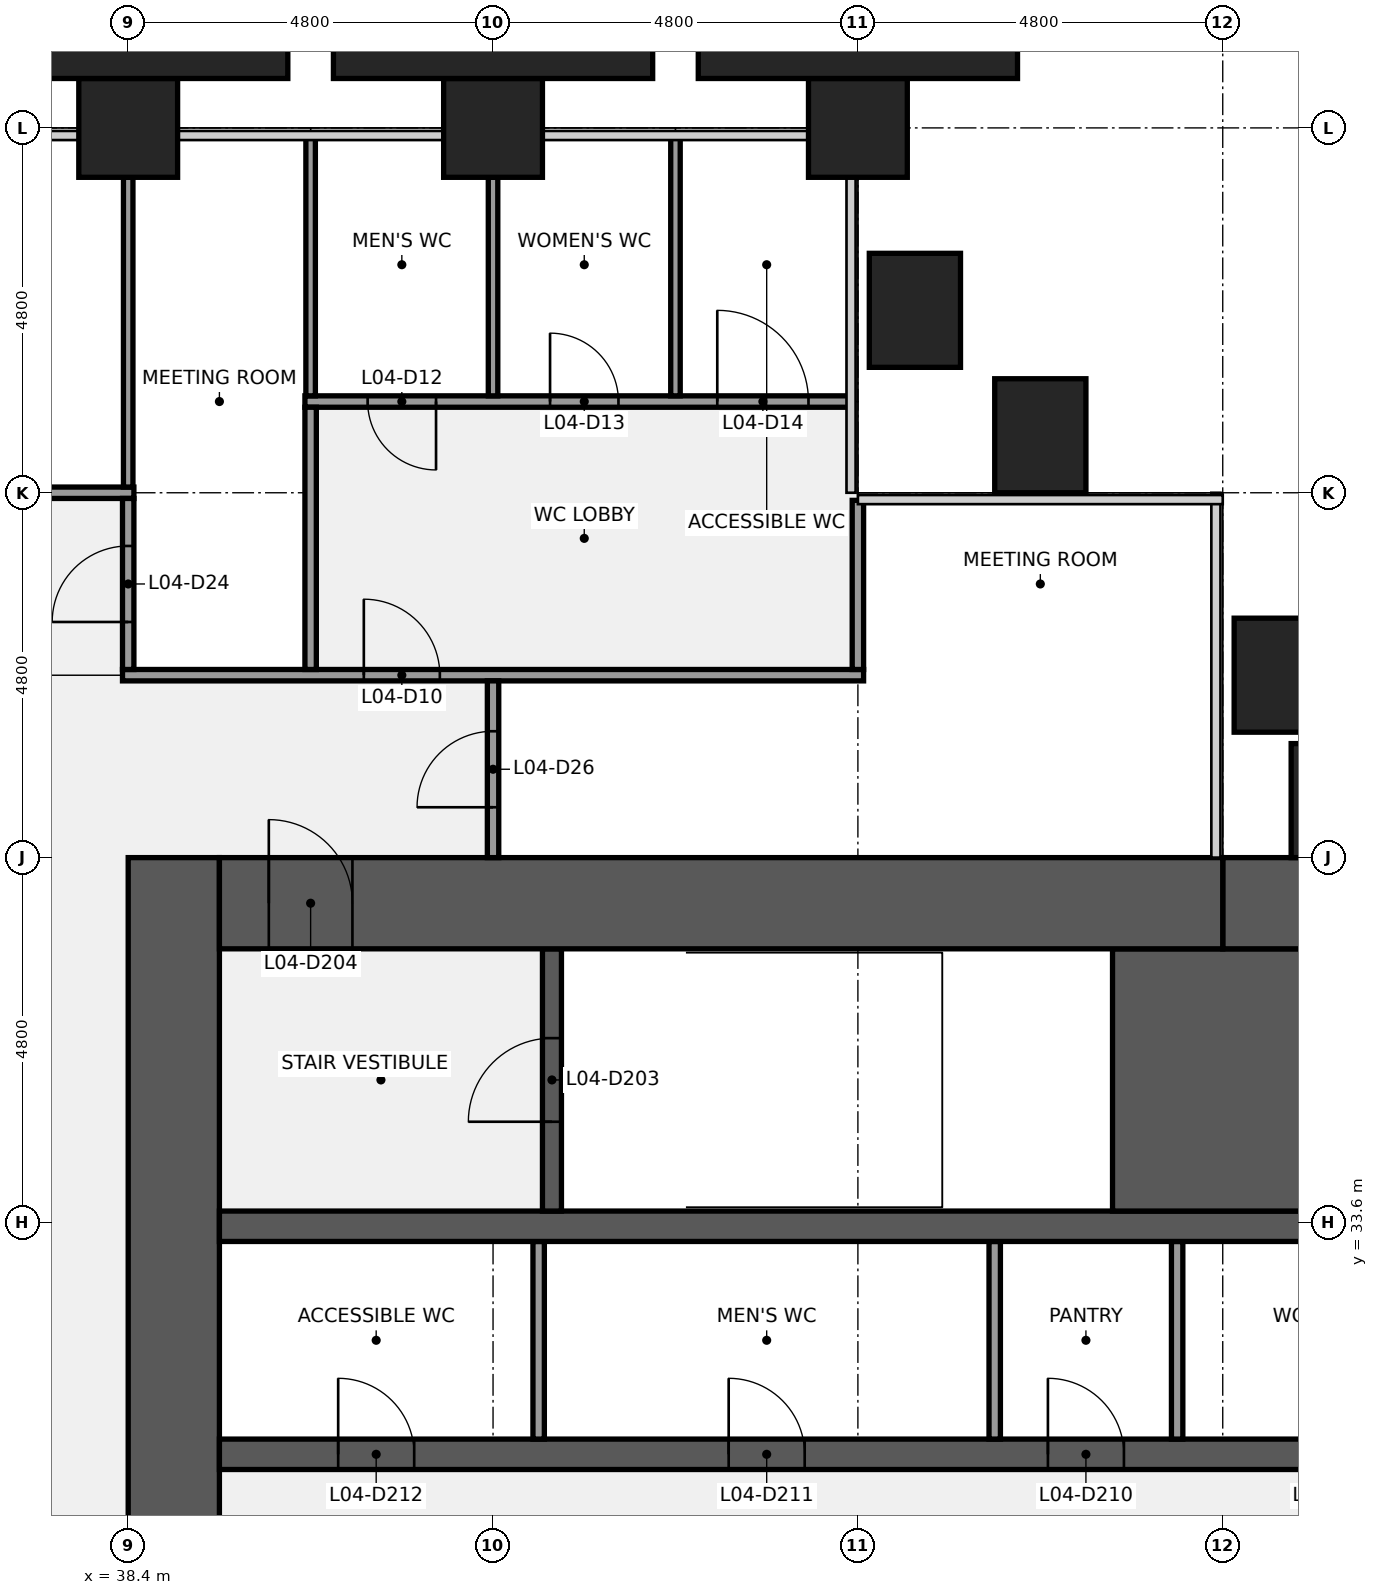
"""IFC4 building model, lengths in metres.
Left out: names, types, materials, properties, quantities, classifications, styles, units other than length and angle.
Written with IfcOpenShell. Run it as: python <this file> out.ifc"""

import sys

from ifc_helpers import new_model, si_unit, direction, frame, frame_2d, origin, origin_2d, place, context, subcontext, project, spatial, rectangle, extrude, element, fill, save


model = new_model("IFC4")
c1 = context("Model", 3, precision=1e-05, world=origin(), true_north=direction((0.0, 1.0)))
c2 = subcontext(c1, "Body", "Model", "MODEL_VIEW")
j1 = project(units=[si_unit("LENGTHUNIT", "METRE"), si_unit("PLANEANGLEUNIT", "RADIAN")], contexts=[c1])
p1 = place(None, origin())
s1 = spatial("IfcSite", under=j1, at=p1, CompositionType="ELEMENT")
p2 = place(p1, origin())
s2 = spatial("IfcBuilding", under=s1, at=p2, CompositionType="ELEMENT")
p3 = place(p2, frame((0.0, 0.0, 25.8)))
s3 = spatial("IfcBuildingStorey", under=s2, at=p3, CompositionType="ELEMENT", Elevation=25.8)
for number, where, z_axis, x_axis in (
    (1, (38.4, 48.0, 0.0), (0.0, 0.0, 1.0), (1.0, 0.0, 0.0)),
    (2, (43.2, 48.0, 0.0), (0.0, 0.0, 1.0), (1.0, 0.0, 0.0)),
    (3, (48.0, 48.0, 0.0), (0.0, 0.0, 1.0), (1.0, 0.0, 0.0)),
):
    element("IfcColumn", number, at=place(p3, frame(where, z_axis=z_axis, x_axis=x_axis)), inside=s3, PredefinedType="COLUMN", context=c2, shape_type="SweptSolid", body=[
        extrude(rectangle(XDim=1.3, YDim=1.3, at=origin_2d()), origin(), (0.0, 0.0, 1.0), 4.4),
    ])
p4 = place(p3, frame((39.0, 9.6, 0.0), z_axis=(0.0, 0.0, 1.0), x_axis=(0.0, 1.0, 0.0)))
e4 = element("IfcWall", 4, at=p4, inside=s3, PredefinedType="SHEAR", context=c2, shape_type="SweptSolid", body=[
    extrude(rectangle(XDim=28.8, YDim=1.2, at=frame_2d((14.4, 0.0))), origin(), (0.0, 0.0, 1.0), 4.24),
])
p5 = place(p4, frame((8.7, 0.0, 0.0)))
e5 = element("IfcOpeningElement", 5, at=p5, cuts=e4, PredefinedType="OPENING", context=c2, shape_type="SweptSolid", body=[
    extrude(rectangle(XDim=1.8, YDim=2.1, at=frame_2d((0.9, 1.05))), frame((0.0, 0.61, 0.0), z_axis=(0.0, -1.0, 0.0), x_axis=(1.0, 0.0, 0.0)), (0.0, 0.0, 1.0), 1.22),
])
p6 = place(p4, frame((18.3, 0.0, 0.0)))
e6 = element("IfcOpeningElement", 6, at=p6, cuts=e4, PredefinedType="OPENING", context=c2, shape_type="SweptSolid", body=[
    extrude(rectangle(XDim=1.8, YDim=2.1, at=frame_2d((0.9, 1.05))), frame((0.0, 0.61, 0.0), z_axis=(0.0, -1.0, 0.0), x_axis=(1.0, 0.0, 0.0)), (0.0, 0.0, 1.0), 1.22),
])
p7 = place(p3, frame((39.6, 30.55, 0.0), z_axis=(0.0, 0.0, 1.0), x_axis=(1.0, 0.0, 0.0)))
e7 = element("IfcWall", 7, at=p7, inside=s3, PredefinedType="SHEAR", context=c2, shape_type="SweptSolid", body=[
    extrude(rectangle(XDim=16.8, YDim=0.4, at=frame_2d((8.4, 0.0))), origin(), (0.0, 0.0, 1.0), 4.24),
])
p8 = place(p7, frame((14.238, 0.0, 0.0)))
e8 = element("IfcOpeningElement", 8, at=p8, cuts=e7, PredefinedType="OPENING", context=c2, shape_type="SweptSolid", body=[
    extrude(rectangle(XDim=1.0, YDim=2.1, at=frame_2d((0.5, 1.05))), frame((0.0, 0.21, 0.0), z_axis=(0.0, -1.0, 0.0), x_axis=(1.0, 0.0, 0.0)), (0.0, 0.0, 1.0), 0.42),
])
p9 = place(p7, frame((10.9, 0.0, 0.0)))
e9 = element("IfcOpeningElement", 9, at=p9, cuts=e7, PredefinedType="OPENING", context=c2, shape_type="SweptSolid", body=[
    extrude(rectangle(XDim=1.0, YDim=2.1, at=frame_2d((0.5, 1.05))), frame((0.0, 0.21, 0.0), z_axis=(0.0, -1.0, 0.0), x_axis=(1.0, 0.0, 0.0)), (0.0, 0.0, 1.0), 0.42),
])
p10 = place(p7, frame((6.7, 0.0, 0.0)))
e10 = element("IfcOpeningElement", 10, at=p10, cuts=e7, PredefinedType="OPENING", context=c2, shape_type="SweptSolid", body=[
    extrude(rectangle(XDim=1.0, YDim=2.1, at=frame_2d((0.5, 1.05))), frame((0.0, 0.21, 0.0), z_axis=(0.0, -1.0, 0.0), x_axis=(1.0, 0.0, 0.0)), (0.0, 0.0, 1.0), 0.42),
])
p11 = place(p7, frame((1.562, 0.0, 0.0)))
e11 = element("IfcOpeningElement", 11, at=p11, cuts=e7, PredefinedType="OPENING", context=c2, shape_type="SweptSolid", body=[
    extrude(rectangle(XDim=1.0, YDim=2.1, at=frame_2d((0.5, 1.05))), frame((0.0, 0.21, 0.0), z_axis=(0.0, -1.0, 0.0), x_axis=(1.0, 0.0, 0.0)), (0.0, 0.0, 1.0), 0.42),
])
for number, where, z_axis, x_axis in (
    (12, (52.2, 30.75, 0.0), (0.0, 0.0, 1.0), (0.0, 1.0, 0.0)),
    (13, (49.8, 30.75, 0.0), (0.0, 0.0, 1.0), (0.0, 1.0, 0.0)),
    (14, (43.8, 30.75, 0.0), (0.0, 0.0, 1.0), (0.0, 1.0, 0.0)),
):
    element("IfcWall", number, at=place(p3, frame(where, z_axis=z_axis, x_axis=x_axis)), inside=s3, PredefinedType="PARTITIONING", context=c2, shape_type="SweptSolid", body=[
        extrude(rectangle(XDim=2.6, YDim=0.15, at=frame_2d((1.3, 0.0))), origin(), (0.0, 0.0, 1.0), 4.24),
    ])
p12 = place(p3, frame((39.6, 33.55, 0.0), z_axis=(0.0, 0.0, 1.0), x_axis=(1.0, 0.0, 0.0)))
e15 = element("IfcWall", 15, at=p12, inside=s3, PredefinedType="SHEAR", context=c2, shape_type="SweptSolid", body=[
    extrude(rectangle(XDim=16.8, YDim=0.4, at=frame_2d((8.4, 0.0))), origin(), (0.0, 0.0, 1.0), 4.24),
])
p13 = place(p3, frame((51.35, 35.475, 0.0), z_axis=(0.0, 0.0, 1.0), x_axis=(1.0, 0.0, 0.0)))
e16 = element("IfcWall", 16, at=p13, inside=s3, PredefinedType="SHEAR", context=c2, shape_type="SweptSolid", body=[
    extrude(rectangle(XDim=5.05, YDim=3.45, at=frame_2d((2.525, 0.0))), origin(), (0.0, 0.0, 1.0), 4.24),
])
p14 = place(p3, frame((43.975, 33.75, 0.0), z_axis=(0.0, 0.0, 1.0), x_axis=(0.0, 1.0, 0.0)))
e17 = element("IfcWall", 17, at=p14, inside=s3, PredefinedType="SHEAR", context=c2, shape_type="SweptSolid", body=[
    extrude(rectangle(XDim=3.45, YDim=0.25, at=frame_2d((1.725, 0.0))), origin(), (0.0, 0.0, 1.0), 4.24),
])
p15 = place(p14, frame((1.175, 0.0, 0.0)))
e18 = element("IfcOpeningElement", 18, at=p15, cuts=e17, PredefinedType="OPENING", context=c2, shape_type="SweptSolid", body=[
    extrude(rectangle(XDim=1.1, YDim=2.1, at=frame_2d((0.55, 1.05))), frame((0.0, 0.135, 0.0), z_axis=(0.0, -1.0, 0.0), x_axis=(1.0, 0.0, 0.0)), (0.0, 0.0, 1.0), 0.27),
])
p16 = place(p3, frame((52.8, 37.8, 0.0), z_axis=(0.0, 0.0, 1.0), x_axis=(1.0, 0.0, 0.0)))
e19 = element("IfcWall", 19, at=p16, inside=s3, PredefinedType="SHEAR", context=c2, shape_type="SweptSolid", body=[
    extrude(rectangle(XDim=3.6, YDim=1.2, at=frame_2d((1.8, 0.0))), origin(), (0.0, 0.0, 1.0), 4.24),
])
p17 = place(p3, frame((39.6, 37.8, 0.0), z_axis=(0.0, 0.0, 1.0), x_axis=(1.0, 0.0, 0.0)))
e20 = element("IfcWall", 20, at=p17, inside=s3, PredefinedType="SHEAR", context=c2, shape_type="SweptSolid", body=[
    extrude(rectangle(XDim=13.2, YDim=1.2, at=frame_2d((6.6, 0.0))), origin(), (0.0, 0.0, 1.0), 4.24),
])
p18 = place(p17, frame((0.65, 0.0, 0.0)))
e21 = element("IfcOpeningElement", 21, at=p18, cuts=e20, PredefinedType="OPENING", context=c2, shape_type="SweptSolid", body=[
    extrude(rectangle(XDim=1.1, YDim=2.1, at=frame_2d((0.55, 1.05))), frame((0.0, 0.61, 0.0), z_axis=(0.0, -1.0, 0.0), x_axis=(1.0, 0.0, 0.0)), (0.0, 0.0, 1.0), 1.22),
])
p19 = place(p3, frame((38.325, 40.8, 0.0), z_axis=(0.0, 0.0, 1.0), x_axis=(1.0, 0.0, 0.0)))
e22 = element("IfcWall", 22, at=p19, inside=s3, PredefinedType="PARTITIONING", context=c2, shape_type="SweptSolid", body=[
    extrude(rectangle(XDim=9.75, YDim=0.15, at=frame_2d((4.875, 0.0))), origin(), (0.0, 0.0, 1.0), 3.27),
])
p20 = place(p19, frame((3.175, 0.0, 0.0)))
e23 = element("IfcOpeningElement", 23, at=p20, cuts=e22, PredefinedType="OPENING", context=c2, shape_type="SweptSolid", body=[
    extrude(rectangle(XDim=1.0, YDim=2.1, at=frame_2d((0.5, 1.05))), frame((0.0, 0.085, 0.0), z_axis=(0.0, -1.0, 0.0), x_axis=(1.0, 0.0, 0.0)), (0.0, 0.0, 1.0), 0.17),
])
p21 = place(p3, frame((19.125, 43.2, 0.0), z_axis=(0.0, 0.0, 1.0), x_axis=(1.0, 0.0, 0.0)))
e24 = element("IfcWall", 24, at=p21, inside=s3, PredefinedType="PARTITIONING", context=c2, shape_type="SweptSolid", body=[
    extrude(rectangle(XDim=19.35, YDim=0.15, at=frame_2d((9.675, 0.0))), origin(), (0.0, 0.0, 1.0), 3.27),
])
p22 = place(p21, frame((9.175, 0.0, 0.0)))
e25 = element("IfcOpeningElement", 25, at=p22, cuts=e24, PredefinedType="OPENING", context=c2, shape_type="SweptSolid", body=[
    extrude(rectangle(XDim=1.0, YDim=2.1, at=frame_2d((0.5, 1.05))), frame((0.0, 0.085, 0.0), z_axis=(0.0, -1.0, 0.0), x_axis=(1.0, 0.0, 0.0)), (0.0, 0.0, 1.0), 0.17),
])
p23 = place(p3, frame((40.725, 44.4, 0.0), z_axis=(0.0, 0.0, 1.0), x_axis=(1.0, 0.0, 0.0)))
e26 = element("IfcWall", 26, at=p23, inside=s3, PredefinedType="PARTITIONING", context=c2, shape_type="SweptSolid", body=[
    extrude(rectangle(XDim=7.175, YDim=0.15, at=frame_2d((3.587, 0.0))), origin(), (0.0, 0.0, 1.0), 3.27),
])
p24 = place(p23, frame((0.825, 0.0, 0.0)))
e27 = element("IfcOpeningElement", 27, at=p24, cuts=e26, PredefinedType="OPENING", context=c2, shape_type="SweptSolid", body=[
    extrude(rectangle(XDim=0.9, YDim=2.1, at=frame_2d((0.45, 1.05))), frame((0.0, 0.085, 0.0), z_axis=(0.0, -1.0, 0.0), x_axis=(1.0, 0.0, 0.0)), (0.0, 0.0, 1.0), 0.17),
])
p25 = place(p23, frame((3.225, 0.0, 0.0)))
e28 = element("IfcOpeningElement", 28, at=p25, cuts=e26, PredefinedType="OPENING", context=c2, shape_type="SweptSolid", body=[
    extrude(rectangle(XDim=0.9, YDim=2.1, at=frame_2d((0.45, 1.05))), frame((0.0, 0.085, 0.0), z_axis=(0.0, -1.0, 0.0), x_axis=(1.0, 0.0, 0.0)), (0.0, 0.0, 1.0), 0.17),
])
p26 = place(p23, frame((5.425, 0.0, 0.0)))
e29 = element("IfcOpeningElement", 29, at=p26, cuts=e26, PredefinedType="OPENING", context=c2, shape_type="SweptSolid", body=[
    extrude(rectangle(XDim=1.2, YDim=2.1, at=frame_2d((0.6, 1.05))), frame((0.0, 0.085, 0.0), z_axis=(0.0, -1.0, 0.0), x_axis=(1.0, 0.0, 0.0)), (0.0, 0.0, 1.0), 0.17),
])
p27 = place(p3, frame((38.4, 43.275, 0.0), z_axis=(0.0, 0.0, 1.0), x_axis=(0.0, 1.0, 0.0)))
e30 = element("IfcWall", 30, at=p27, inside=s3, PredefinedType="PARTITIONING", context=c2, shape_type="SweptSolid", body=[
    extrude(rectangle(XDim=4.075, YDim=0.125, at=frame_2d((2.038, 0.0))), origin(), (0.0, 0.0, 1.0), 3.27),
])
p28 = place(p3, frame((38.4, 40.875, 0.0), z_axis=(0.0, 0.0, 1.0), x_axis=(0.0, 1.0, 0.0)))
e31 = element("IfcWall", 31, at=p28, inside=s3, PredefinedType="PARTITIONING", context=c2, shape_type="SweptSolid", body=[
    extrude(rectangle(XDim=2.25, YDim=0.15, at=frame_2d((1.125, 0.0))), origin(), (0.0, 0.0, 1.0), 3.27),
])
p29 = place(p28, frame((0.625, 0.0, 0.0)))
e32 = element("IfcOpeningElement", 32, at=p29, cuts=e31, PredefinedType="OPENING", context=c2, shape_type="SweptSolid", body=[
    extrude(rectangle(XDim=1.0, YDim=2.1, at=frame_2d((0.5, 1.05))), frame((0.0, 0.085, 0.0), z_axis=(0.0, -1.0, 0.0), x_axis=(1.0, 0.0, 0.0)), (0.0, 0.0, 1.0), 0.17),
])
p30 = place(p3, frame((40.8, 44.475, 0.0), z_axis=(0.0, 0.0, 1.0), x_axis=(0.0, 1.0, 0.0)))
e33 = element("IfcWall", 33, at=p30, inside=s3, PredefinedType="PARTITIONING", context=c2, shape_type="SweptSolid", body=[
    extrude(rectangle(XDim=3.425, YDim=0.125, at=frame_2d((1.712, 0.0))), origin(), (0.0, 0.0, 1.0), 3.27),
])
p31 = place(p3, frame((40.8, 40.875, 0.0), z_axis=(0.0, 0.0, 1.0), x_axis=(0.0, 1.0, 0.0)))
e34 = element("IfcWall", 34, at=p31, inside=s3, PredefinedType="PARTITIONING", context=c2, shape_type="SweptSolid", body=[
    extrude(rectangle(XDim=3.45, YDim=0.15, at=frame_2d((1.725, 0.0))), origin(), (0.0, 0.0, 1.0), 3.27),
])
p32 = place(p3, frame((43.2, 44.475, 0.0), z_axis=(0.0, 0.0, 1.0), x_axis=(0.0, 1.0, 0.0)))
e35 = element("IfcWall", 35, at=p32, inside=s3, PredefinedType="PARTITIONING", context=c2, shape_type="SweptSolid", body=[
    extrude(rectangle(XDim=2.875, YDim=0.125, at=frame_2d((1.438, 0.0))), origin(), (0.0, 0.0, 1.0), 3.27),
])
p33 = place(p3, frame((43.2, 38.4, 0.0), z_axis=(0.0, 0.0, 1.0), x_axis=(0.0, 1.0, 0.0)))
e36 = element("IfcWall", 36, at=p33, inside=s3, PredefinedType="PARTITIONING", context=c2, shape_type="SweptSolid", body=[
    extrude(rectangle(XDim=2.325, YDim=0.15, at=frame_2d((1.163, 0.0))), origin(), (0.0, 0.0, 1.0), 3.27),
])
p34 = place(p33, frame((0.663, 0.0, 0.0)))
e37 = element("IfcOpeningElement", 37, at=p34, cuts=e36, PredefinedType="OPENING", context=c2, shape_type="SweptSolid", body=[
    extrude(rectangle(XDim=1.0, YDim=2.1, at=frame_2d((0.5, 1.05))), frame((0.0, 0.085, 0.0), z_axis=(0.0, -1.0, 0.0), x_axis=(1.0, 0.0, 0.0)), (0.0, 0.0, 1.0), 0.17),
])
p35 = place(p3, frame((45.6, 44.475, 0.0), z_axis=(0.0, 0.0, 1.0), x_axis=(0.0, 1.0, 0.0)))
e38 = element("IfcWall", 38, at=p35, inside=s3, PredefinedType="PARTITIONING", context=c2, shape_type="SweptSolid", body=[
    extrude(rectangle(XDim=3.425, YDim=0.125, at=frame_2d((1.712, 0.0))), origin(), (0.0, 0.0, 1.0), 3.27),
])
p36 = place(p3, frame((48.0, 40.875, 0.0), z_axis=(0.0, 0.0, 1.0), x_axis=(0.0, 1.0, 0.0)))
e39 = element("IfcWall", 39, at=p36, inside=s3, PredefinedType="PARTITIONING", context=c2, shape_type="SweptSolid", body=[
    extrude(rectangle(XDim=2.225, YDim=0.15, at=frame_2d((1.113, 0.0))), origin(), (0.0, 0.0, 1.0), 3.27),
])
for number, where, z_axis, x_axis in (
    (40, (53.55, 40.8, 0.0), (0.0, 0.0, 1.0), (0.0, 1.0, 0.0)),
    (41, (50.4, 43.95, 0.0), (0.0, 0.0, 1.0), (1.0, 0.0, 0.0)),
    (42, (48.75, 45.6, 0.0), (0.0, 0.0, 1.0), (0.0, 1.0, 0.0)),
):
    element("IfcColumn", number, at=place(p3, frame(where, z_axis=z_axis, x_axis=x_axis)), inside=s3, PredefinedType="PILASTER", context=c2, shape_type="SweptSolid", body=[
        extrude(rectangle(XDim=1.2, YDim=1.5, at=origin_2d()), origin(), (0.0, 0.0, 1.0), 4.4),
    ])
p37 = place(p3, frame((55.2, 39.15, 0.0), z_axis=(0.0, 0.0, 1.0), x_axis=(1.0, 0.0, 0.0)))
e43 = element("IfcColumn", 43, at=p37, inside=s3, PredefinedType="PILASTER", context=c2, shape_type="SweptSolid", body=[
    extrude(rectangle(XDim=3.0, YDim=1.5, at=origin_2d()), origin(), (0.0, 0.0, 1.0), 4.4),
])
for number, where, z_axis, x_axis in (
    (44, (38.4, 49.075, 0.0), (0.0, 0.0, 1.0), (1.0, 0.0, 0.0)),
    (45, (43.2, 49.075, 0.0), (0.0, 0.0, 1.0), (1.0, 0.0, 0.0)),
    (46, (48.0, 49.075, 0.0), (0.0, 0.0, 1.0), (1.0, 0.0, 0.0)),
):
    element("IfcColumn", number, at=place(p3, frame(where, z_axis=z_axis, x_axis=x_axis)), inside=s3, PredefinedType="PILASTER", context=c2, shape_type="SweptSolid", body=[
        extrude(rectangle(XDim=4.2, YDim=0.85, at=origin_2d()), origin(), (0.0, 0.0, 1.0), 4.4),
    ])
p38 = place(p15, origin())
e47 = element("IfcDoor", 47, at=p38, inside=s3, OperationType="SINGLE_SWING_LEFT", PredefinedType="DOOR", context=c2, shape_type="SweptSolid", body=[
    extrude(rectangle(XDim=1.1, YDim=2.1, at=frame_2d((0.55, 1.05))), frame((0.0, 0.025, 0.0), z_axis=(0.0, -1.0, 0.0), x_axis=(1.0, 0.0, 0.0)), (0.0, 0.0, 1.0), 0.05),
])
fill(e18, e47)
p39 = place(p18, origin())
e48 = element("IfcDoor", 48, at=p39, inside=s3, OperationType="SINGLE_SWING_LEFT", PredefinedType="DOOR", context=c2, shape_type="SweptSolid", body=[
    extrude(rectangle(XDim=1.1, YDim=2.1, at=frame_2d((0.55, 1.05))), frame((0.0, 0.025, 0.0), z_axis=(0.0, -1.0, 0.0), x_axis=(1.0, 0.0, 0.0)), (0.0, 0.0, 1.0), 0.05),
])
fill(e21, e48)
p40 = place(p9, origin())
e49 = element("IfcDoor", 49, at=p40, inside=s3, OperationType="SINGLE_SWING_LEFT", PredefinedType="DOOR", context=c2, shape_type="SweptSolid", body=[
    extrude(rectangle(XDim=1.0, YDim=2.1, at=frame_2d((0.5, 1.05))), frame((0.0, 0.025, 0.0), z_axis=(0.0, -1.0, 0.0), x_axis=(1.0, 0.0, 0.0)), (0.0, 0.0, 1.0), 0.05),
])
fill(e9, e49)
p41 = place(p10, origin())
e50 = element("IfcDoor", 50, at=p41, inside=s3, OperationType="SINGLE_SWING_LEFT", PredefinedType="DOOR", context=c2, shape_type="SweptSolid", body=[
    extrude(rectangle(XDim=1.0, YDim=2.1, at=frame_2d((0.5, 1.05))), frame((0.0, 0.025, 0.0), z_axis=(0.0, -1.0, 0.0), x_axis=(1.0, 0.0, 0.0)), (0.0, 0.0, 1.0), 0.05),
])
fill(e10, e50)
p42 = place(p11, origin())
e51 = element("IfcDoor", 51, at=p42, inside=s3, OperationType="SINGLE_SWING_LEFT", PredefinedType="DOOR", context=c2, shape_type="SweptSolid", body=[
    extrude(rectangle(XDim=1.0, YDim=2.1, at=frame_2d((0.5, 1.05))), frame((0.0, 0.025, 0.0), z_axis=(0.0, -1.0, 0.0), x_axis=(1.0, 0.0, 0.0)), (0.0, 0.0, 1.0), 0.05),
])
fill(e11, e51)
p43 = place(p20, origin())
e52 = element("IfcDoor", 52, at=p43, inside=s3, OperationType="SINGLE_SWING_LEFT", PredefinedType="DOOR", context=c2, shape_type="SweptSolid", body=[
    extrude(rectangle(XDim=1.0, YDim=2.1, at=frame_2d((0.5, 1.05))), frame((0.0, 0.025, 0.0), z_axis=(0.0, -1.0, 0.0), x_axis=(1.0, 0.0, 0.0)), (0.0, 0.0, 1.0), 0.05),
])
fill(e23, e52)
p44 = place(p24, origin())
e53 = element("IfcDoor", 53, at=p44, inside=s3, OperationType="SINGLE_SWING_RIGHT", PredefinedType="DOOR", context=c2, shape_type="SweptSolid", body=[
    extrude(rectangle(XDim=0.9, YDim=2.1, at=frame_2d((0.45, 1.05))), frame((0.0, 0.025, 0.0), z_axis=(0.0, -1.0, 0.0), x_axis=(1.0, 0.0, 0.0)), (0.0, 0.0, 1.0), 0.05),
])
fill(e27, e53)
p45 = place(p25, origin())
e54 = element("IfcDoor", 54, at=p45, inside=s3, OperationType="SINGLE_SWING_LEFT", PredefinedType="DOOR", context=c2, shape_type="SweptSolid", body=[
    extrude(rectangle(XDim=0.9, YDim=2.1, at=frame_2d((0.45, 1.05))), frame((0.0, 0.025, 0.0), z_axis=(0.0, -1.0, 0.0), x_axis=(1.0, 0.0, 0.0)), (0.0, 0.0, 1.0), 0.05),
])
fill(e28, e54)
p46 = place(p26, origin())
e55 = element("IfcDoor", 55, at=p46, inside=s3, OperationType="SINGLE_SWING_LEFT", PredefinedType="DOOR", context=c2, shape_type="SweptSolid", body=[
    extrude(rectangle(XDim=1.2, YDim=2.1, at=frame_2d((0.6, 1.05))), frame((0.0, 0.025, 0.0), z_axis=(0.0, -1.0, 0.0), x_axis=(1.0, 0.0, 0.0)), (0.0, 0.0, 1.0), 0.05),
])
fill(e29, e55)
p47 = place(p29, origin())
e56 = element("IfcDoor", 56, at=p47, inside=s3, OperationType="SINGLE_SWING_LEFT", PredefinedType="DOOR", context=c2, shape_type="SweptSolid", body=[
    extrude(rectangle(XDim=1.0, YDim=2.1, at=frame_2d((0.5, 1.05))), frame((0.0, 0.025, 0.0), z_axis=(0.0, -1.0, 0.0), x_axis=(1.0, 0.0, 0.0)), (0.0, 0.0, 1.0), 0.05),
])
fill(e32, e56)
p48 = place(p34, origin())
e57 = element("IfcDoor", 57, at=p48, inside=s3, OperationType="SINGLE_SWING_LEFT", PredefinedType="DOOR", context=c2, shape_type="SweptSolid", body=[
    extrude(rectangle(XDim=1.0, YDim=2.1, at=frame_2d((0.5, 1.05))), frame((0.0, 0.025, 0.0), z_axis=(0.0, -1.0, 0.0), x_axis=(1.0, 0.0, 0.0)), (0.0, 0.0, 1.0), 0.05),
])
fill(e37, e57)
save(model, sys.argv[1])
